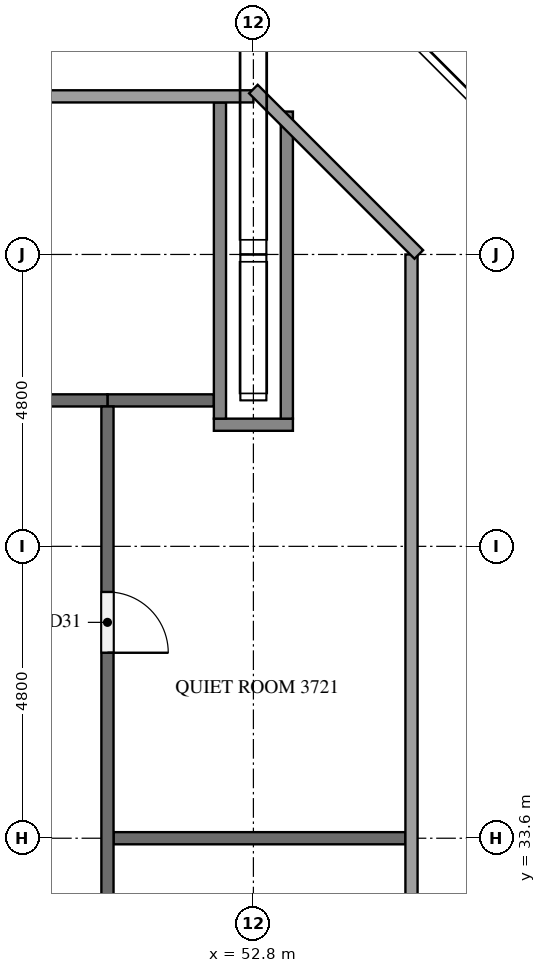
"""IFC4 building model, lengths in metres.
Left out: names, types, materials, properties, quantities, classifications, styles, units other than length and angle.
Written with IfcOpenShell. Run it as: python <this file> out.ifc"""

import sys

from ifc_helpers import new_model, si_unit, direction, frame, frame_2d, origin, place, context, subcontext, project, spatial, rectangle, extrude, element, fill, save


model = new_model("IFC4")
c1 = context("Model", 3, precision=1e-05, world=origin(), true_north=direction((0.0, 1.0)))
c2 = subcontext(c1, "Body", "Model", "MODEL_VIEW")
j1 = project(units=[si_unit("LENGTHUNIT", "METRE"), si_unit("PLANEANGLEUNIT", "RADIAN")], contexts=[c1])
p1 = place(None, origin())
s1 = spatial("IfcSite", under=j1, at=p1, CompositionType="ELEMENT")
p2 = place(p1, origin())
s2 = spatial("IfcBuilding", under=s1, at=p2, CompositionType="ELEMENT")
p3 = place(p2, frame((0.0, 0.0, 143.6)))
s3 = spatial("IfcBuildingStorey", under=s2, at=p3, CompositionType="ELEMENT", Elevation=143.6)
p4 = place(p3, frame((50.5, 33.6, 0.0), z_axis=(0.0, 0.0, 1.0), x_axis=(1.0, 0.0, 0.0)))
e1 = element("IfcWall", 1, at=p4, inside=s3, PredefinedType="PARTITIONING", context=c2, shape_type="SweptSolid", body=[
    extrude(rectangle(XDim=4.8, YDim=0.2, at=frame_2d((2.4, 0.0))), origin(), (0.0, 0.0, 1.0), 5.1),
])
p5 = place(p3, frame((52.15, 40.4, 0.0), z_axis=(0.0, 0.0, 1.0), x_axis=(1.0, 0.0, 0.0)))
e2 = element("IfcWall", 2, at=p5, inside=s3, PredefinedType="PARTITIONING", context=c2, shape_type="SweptSolid", body=[
    extrude(rectangle(XDim=1.3, YDim=0.2, at=frame_2d((0.65, 0.0))), origin(), (0.0, 0.0, 1.0), 5.1),
])
p6 = place(p3, frame((50.4, 40.8, 0.0), z_axis=(0.0, 0.0, 1.0), x_axis=(1.0, 0.0, 0.0)))
e3 = element("IfcWall", 3, at=p6, inside=s3, PredefinedType="PARTITIONING", context=c2, shape_type="SweptSolid", body=[
    extrude(rectangle(XDim=1.75, YDim=0.2, at=frame_2d((0.875, 0.0))), origin(), (0.0, 0.0, 1.0), 5.1),
])
p7 = place(p3, frame((43.65, 40.8, 0.0), z_axis=(0.0, 0.0, 1.0), x_axis=(1.0, 0.0, 0.0)))
e4 = element("IfcWall", 4, at=p7, inside=s3, PredefinedType="PARTITIONING", context=c2, shape_type="SweptSolid", body=[
    extrude(rectangle(XDim=6.75, YDim=0.2, at=frame_2d((3.375, 0.0))), origin(), (0.0, 0.0, 1.0), 5.1),
])
p8 = place(p7, frame((2.85, 0.0, 0.0)))
e5 = element("IfcOpeningElement", 5, at=p8, cuts=e4, PredefinedType="OPENING", context=c2, shape_type="SweptSolid", body=[
    extrude(rectangle(XDim=1.0, YDim=2.1, at=frame_2d((0.5, 1.05))), frame((0.0, 0.11, 0.0), z_axis=(0.0, -1.0, 0.0), x_axis=(1.0, 0.0, 0.0)), (0.0, 0.0, 1.0), 0.22),
])
p9 = place(p3, frame((50.4, 40.7, 0.0), z_axis=(0.0, 0.0, 1.0), x_axis=(0.0, -1.0, 0.0)))
e6 = element("IfcWall", 6, at=p9, inside=s3, PredefinedType="PARTITIONING", context=c2, shape_type="SweptSolid", body=[
    extrude(rectangle(XDim=28.6, YDim=0.2, at=frame_2d((14.3, 0.0))), origin(), (0.0, 0.0, 1.0), 5.1),
])
p10 = place(p9, frame((24.55, 0.0, 0.0)))
e7 = element("IfcOpeningElement", 7, at=p10, cuts=e6, PredefinedType="OPENING", context=c2, shape_type="SweptSolid", body=[
    extrude(rectangle(XDim=1.0, YDim=2.1, at=frame_2d((0.5, 1.05))), frame((0.0, 0.11, 0.0), z_axis=(0.0, -1.0, 0.0), x_axis=(1.0, 0.0, 0.0)), (0.0, 0.0, 1.0), 0.22),
])
p11 = place(p9, frame((18.65, 0.0, 0.0)))
e8 = element("IfcOpeningElement", 8, at=p11, cuts=e6, PredefinedType="OPENING", context=c2, shape_type="SweptSolid", body=[
    extrude(rectangle(XDim=1.0, YDim=2.1, at=frame_2d((0.5, 1.05))), frame((0.0, 0.11, 0.0), z_axis=(0.0, -1.0, 0.0), x_axis=(1.0, 0.0, 0.0)), (0.0, 0.0, 1.0), 0.22),
])
p12 = place(p9, frame((13.85, 0.0, 0.0)))
e9 = element("IfcOpeningElement", 9, at=p12, cuts=e6, PredefinedType="OPENING", context=c2, shape_type="SweptSolid", body=[
    extrude(rectangle(XDim=1.0, YDim=2.1, at=frame_2d((0.5, 1.05))), frame((0.0, 0.11, 0.0), z_axis=(0.0, -1.0, 0.0), x_axis=(1.0, 0.0, 0.0)), (0.0, 0.0, 1.0), 0.22),
])
p13 = place(p9, frame((9.05, 0.0, 0.0)))
e10 = element("IfcOpeningElement", 10, at=p13, cuts=e6, PredefinedType="OPENING", context=c2, shape_type="SweptSolid", body=[
    extrude(rectangle(XDim=1.0, YDim=2.1, at=frame_2d((0.5, 1.05))), frame((0.0, 0.11, 0.0), z_axis=(0.0, -1.0, 0.0), x_axis=(1.0, 0.0, 0.0)), (0.0, 0.0, 1.0), 0.22),
])
p14 = place(p9, frame((3.05, 0.0, 0.0)))
e11 = element("IfcOpeningElement", 11, at=p14, cuts=e6, PredefinedType="OPENING", context=c2, shape_type="SweptSolid", body=[
    extrude(rectangle(XDim=1.0, YDim=2.1, at=frame_2d((0.5, 1.05))), frame((0.0, 0.11, 0.0), z_axis=(0.0, -1.0, 0.0), x_axis=(1.0, 0.0, 0.0)), (0.0, 0.0, 1.0), 0.22),
])
p15 = place(p3, frame((52.25, 40.5, 0.0), z_axis=(0.0, 0.0, 1.0), x_axis=(0.0, 1.0, 0.0)))
e12 = element("IfcWall", 12, at=p15, inside=s3, PredefinedType="PARTITIONING", context=c2, shape_type="SweptSolid", body=[
    extrude(rectangle(XDim=5.2, YDim=0.2, at=frame_2d((2.6, 0.0))), origin(), (0.0, 0.0, 1.0), 5.1),
])
p16 = place(p3, frame((53.35, 40.5, 0.0), z_axis=(0.0, 0.0, 1.0), x_axis=(0.0, 1.0, 0.0)))
e13 = element("IfcWall", 13, at=p16, inside=s3, PredefinedType="PARTITIONING", context=c2, shape_type="SweptSolid", body=[
    extrude(rectangle(XDim=5.05, YDim=0.2, at=frame_2d((2.525, 0.0))), origin(), (0.0, 0.0, 1.0), 5.1),
])
p17 = place(p14, origin())
e14 = element("IfcDoor", 14, at=p17, inside=s3, OperationType="SINGLE_SWING_RIGHT", PredefinedType="DOOR", context=c2, shape_type="SweptSolid", body=[
    extrude(rectangle(XDim=1.0, YDim=2.1, at=frame_2d((0.5, 1.05))), frame((0.0, 0.025, 0.0), z_axis=(0.0, -1.0, 0.0), x_axis=(1.0, 0.0, 0.0)), (0.0, 0.0, 1.0), 0.05),
])
fill(e11, e14)
save(model, sys.argv[1])
